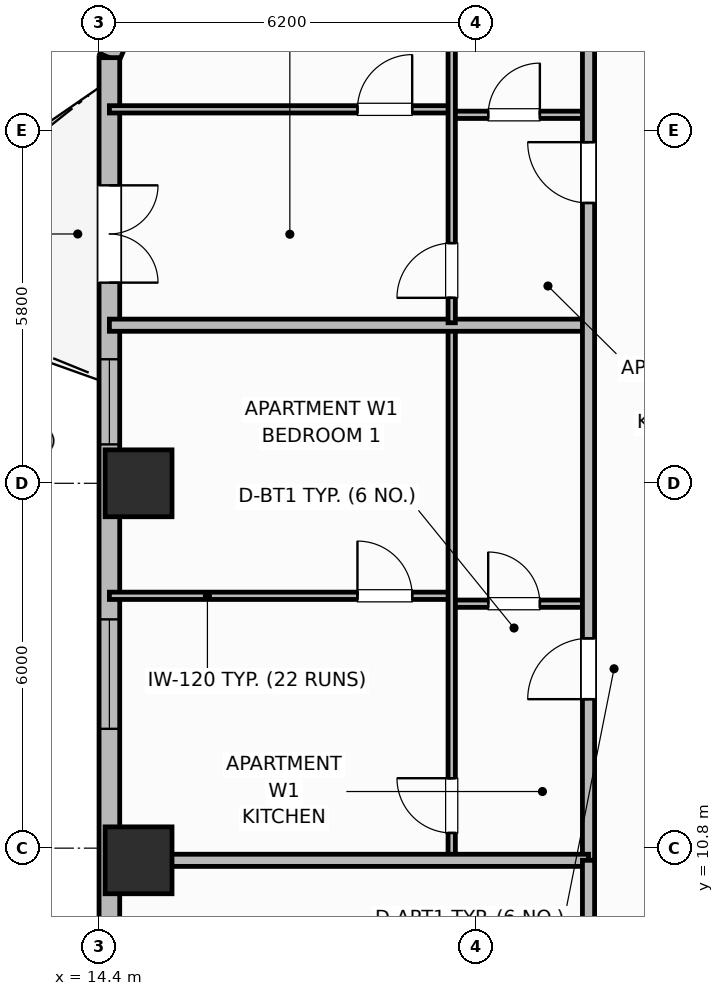
"""IFC4 building model, lengths in metres.
Left out: names, types, materials, properties, quantities, classifications, styles, units other than length and angle.
Written with IfcOpenShell. Run it as: python <this file> out.ifc"""

import sys

from ifc_helpers import new_model, si_unit, direction, frame, frame_2d, origin, origin_2d, place, context, subcontext, project, spatial, rectangle, extrude, element, fill, save


model = new_model("IFC4")
c1 = context("Model", 3, precision=1e-05, world=origin(), true_north=direction((0.0, 1.0)))
c2 = subcontext(c1, "Body", "Model", "MODEL_VIEW")
j1 = project(units=[si_unit("LENGTHUNIT", "METRE"), si_unit("PLANEANGLEUNIT", "RADIAN")], contexts=[c1])
p1 = place(None, origin())
s1 = spatial("IfcSite", under=j1, at=p1, CompositionType="ELEMENT")
p2 = place(p1, origin())
s2 = spatial("IfcBuilding", under=s1, at=p2, CompositionType="ELEMENT")
p3 = place(p2, frame((0.0, 0.0, 103.1)))
s3 = spatial("IfcBuildingStorey", under=s2, at=p3, CompositionType="ELEMENT", Elevation=103.1)
for number, where, z_axis, x_axis in (
    (1, (15.05, 10.6, 0.0), (0.0, 0.0, 1.0), (1.0, 0.0, 0.0)),
    (2, (15.05, 16.8, 0.0), (0.0, 0.0, 1.0), (1.0, 0.0, 0.0)),
):
    element("IfcColumn", number, at=place(p3, frame(where, z_axis=z_axis, x_axis=x_axis)), inside=s3, PredefinedType="COLUMN", context=c2, shape_type="SweptSolid", body=[
        extrude(rectangle(XDim=1.1, YDim=1.1, at=origin_2d()), origin(), (0.0, 0.0, 1.0), 3.7),
    ])
p4 = place(p3, frame((15.52, 26.0, 0.0), z_axis=(0.0, 0.0, 1.0), x_axis=(-0.396426258231, -0.918066567186, 0.0)))
e3 = element("IfcWall", 3, at=p4, inside=s3, PredefinedType="SOLIDWALL", context=c2, shape_type="SweptSolid", body=[
    extrude(rectangle(XDim=2.396, YDim=0.34, at=frame_2d((1.198, 0.0))), origin(), (0.0, 0.0, 1.0), 2.7),
])
p5 = place(p4, frame((0.648, 0.0, 0.89)))
e4 = element("IfcOpeningElement", 4, at=p5, cuts=e3, PredefinedType="OPENING", context=c2, shape_type="SweptSolid", body=[
    extrude(rectangle(XDim=1.1, YDim=1.65, at=frame_2d((0.55, 0.825))), frame((0.0, 0.18, 0.0), z_axis=(0.0, -1.0, 0.0), x_axis=(1.0, 0.0, 0.0)), (0.0, 0.0, 1.0), 0.36),
])
p6 = place(p3, frame((14.57, 23.8, 0.0), z_axis=(0.0, 0.0, 1.0), x_axis=(0.0, -1.0, 0.0)))
e5 = element("IfcWall", 5, at=p6, inside=s3, PredefinedType="SOLIDWALL", context=c2, shape_type="SweptSolid", body=[
    extrude(rectangle(XDim=14.8, YDim=0.34, at=frame_2d((7.4, 0.0))), origin(), (0.0, 0.0, 1.0), 2.7),
])
p7 = place(p6, frame((2.1, 0.0, 0.0)))
e6 = element("IfcOpeningElement", 6, at=p7, cuts=e5, PredefinedType="OPENING", context=c2, shape_type="SweptSolid", body=[
    extrude(rectangle(XDim=1.6, YDim=2.1, at=frame_2d((0.8, 1.05))), frame((0.0, 0.18, 0.0), z_axis=(0.0, -1.0, 0.0), x_axis=(1.0, 0.0, 0.0)), (0.0, 0.0, 1.0), 0.36),
])
p8 = place(p6, frame((4.96, 0.0, 0.69)))
e7 = element("IfcOpeningElement", 7, at=p8, cuts=e5, PredefinedType="OPENING", context=c2, shape_type="SweptSolid", body=[
    extrude(rectangle(XDim=1.4, YDim=1.85, at=frame_2d((0.7, 0.925))), frame((0.0, 0.18, 0.0), z_axis=(0.0, -1.0, 0.0), x_axis=(1.0, 0.0, 0.0)), (0.0, 0.0, 1.0), 0.36),
])
p9 = place(p6, frame((9.238, 0.0, 0.73)))
e8 = element("IfcOpeningElement", 8, at=p9, cuts=e5, PredefinedType="OPENING", context=c2, shape_type="SweptSolid", body=[
    extrude(rectangle(XDim=1.8, YDim=1.85, at=frame_2d((0.9, 0.925))), frame((0.0, 0.18, 0.0), z_axis=(0.0, -1.0, 0.0), x_axis=(1.0, 0.0, 0.0)), (0.0, 0.0, 1.0), 0.36),
])
p10 = place(p3, frame((20.2, 14.82, 0.0), z_axis=(0.0, 0.0, 1.0), x_axis=(1.0, 0.0, 0.0)))
e9 = element("IfcWall", 9, at=p10, inside=s3, PredefinedType="PARTITIONING", context=c2, shape_type="SweptSolid", body=[
    extrude(rectangle(XDim=2.25, YDim=0.12, at=frame_2d((1.125, 0.0))), origin(), (0.0, 0.0, 1.0), 2.53),
])
p11 = place(p10, frame((0.6, 0.0, 0.0)))
e10 = element("IfcOpeningElement", 10, at=p11, cuts=e9, PredefinedType="OPENING", context=c2, shape_type="SweptSolid", body=[
    extrude(rectangle(XDim=0.85, YDim=2.1, at=frame_2d((0.425, 1.05))), frame((0.0, 0.07, 0.0), z_axis=(0.0, -1.0, 0.0), x_axis=(1.0, 0.0, 0.0)), (0.0, 0.0, 1.0), 0.14),
])
p12 = place(p3, frame((14.57, 14.95, 0.0), z_axis=(0.0, 0.0, 1.0), x_axis=(1.0, 0.0, 0.0)))
e11 = element("IfcWall", 11, at=p12, inside=s3, PredefinedType="PARTITIONING", context=c2, shape_type="SweptSolid", body=[
    extrude(rectangle(XDim=5.63, YDim=0.12, at=frame_2d((2.815, 0.0))), origin(), (0.0, 0.0, 1.0), 2.53),
])
p13 = place(p12, frame((4.08, 0.0, 0.0)))
e12 = element("IfcOpeningElement", 12, at=p13, cuts=e11, PredefinedType="OPENING", context=c2, shape_type="SweptSolid", body=[
    extrude(rectangle(XDim=0.9, YDim=2.1, at=frame_2d((0.45, 1.05))), frame((0.0, 0.07, 0.0), z_axis=(0.0, -1.0, 0.0), x_axis=(1.0, 0.0, 0.0)), (0.0, 0.0, 1.0), 0.14),
])
p14 = place(p3, frame((20.2, 10.64, 0.0), z_axis=(0.0, 0.0, 1.0), x_axis=(0.0, 1.0, 0.0)))
e13 = element("IfcWall", 13, at=p14, inside=s3, PredefinedType="PARTITIONING", context=c2, shape_type="SweptSolid", body=[
    extrude(rectangle(XDim=8.72, YDim=0.12, at=frame_2d((4.36, 0.0))), origin(), (0.0, 0.0, 1.0), 2.53),
])
p15 = place(p14, frame((0.41, 0.0, 0.0)))
e14 = element("IfcOpeningElement", 14, at=p15, cuts=e13, PredefinedType="OPENING", context=c2, shape_type="SweptSolid", body=[
    extrude(rectangle(XDim=0.9, YDim=2.1, at=frame_2d((0.45, 1.05))), frame((0.0, 0.07, 0.0), z_axis=(0.0, -1.0, 0.0), x_axis=(1.0, 0.0, 0.0)), (0.0, 0.0, 1.0), 0.14),
])
p16 = place(p3, frame((14.57, 19.4, 0.0), z_axis=(0.0, 0.0, 1.0), x_axis=(1.0, 0.0, 0.0)))
e15 = element("IfcWall", 15, at=p16, inside=s3, PredefinedType="PARTITIONING", context=c2, shape_type="SweptSolid", body=[
    extrude(rectangle(XDim=7.88, YDim=0.2, at=frame_2d((3.94, 0.0))), origin(), (0.0, 0.0, 1.0), 2.53),
])
p17 = place(p3, frame((20.2, 22.86, 0.0), z_axis=(0.0, 0.0, 1.0), x_axis=(1.0, 0.0, 0.0)))
e16 = element("IfcWall", 16, at=p17, inside=s3, PredefinedType="PARTITIONING", context=c2, shape_type="SweptSolid", body=[
    extrude(rectangle(XDim=2.25, YDim=0.12, at=frame_2d((1.125, 0.0))), origin(), (0.0, 0.0, 1.0), 2.53),
])
p18 = place(p17, frame((0.6, 0.0, 0.0)))
e17 = element("IfcOpeningElement", 17, at=p18, cuts=e16, PredefinedType="OPENING", context=c2, shape_type="SweptSolid", body=[
    extrude(rectangle(XDim=0.85, YDim=2.1, at=frame_2d((0.425, 1.05))), frame((0.0, 0.07, 0.0), z_axis=(0.0, -1.0, 0.0), x_axis=(1.0, 0.0, 0.0)), (0.0, 0.0, 1.0), 0.14),
])
p19 = place(p3, frame((14.57, 22.95, 0.0), z_axis=(0.0, 0.0, 1.0), x_axis=(1.0, 0.0, 0.0)))
e18 = element("IfcWall", 18, at=p19, inside=s3, PredefinedType="PARTITIONING", context=c2, shape_type="SweptSolid", body=[
    extrude(rectangle(XDim=5.63, YDim=0.12, at=frame_2d((2.815, 0.0))), origin(), (0.0, 0.0, 1.0), 2.53),
])
p20 = place(p19, frame((4.08, 0.0, 0.0)))
e19 = element("IfcOpeningElement", 19, at=p20, cuts=e18, PredefinedType="OPENING", context=c2, shape_type="SweptSolid", body=[
    extrude(rectangle(XDim=0.9, YDim=2.1, at=frame_2d((0.45, 1.05))), frame((0.0, 0.07, 0.0), z_axis=(0.0, -1.0, 0.0), x_axis=(1.0, 0.0, 0.0)), (0.0, 0.0, 1.0), 0.14),
])
p21 = place(p3, frame((20.2, 19.44, 0.0), z_axis=(0.0, 0.0, 1.0), x_axis=(0.0, 1.0, 0.0)))
e20 = element("IfcWall", 20, at=p21, inside=s3, PredefinedType="PARTITIONING", context=c2, shape_type="SweptSolid", body=[
    extrude(rectangle(XDim=7.12, YDim=0.12, at=frame_2d((3.56, 0.0))), origin(), (0.0, 0.0, 1.0), 2.53),
])
p22 = place(p21, frame((0.41, 0.0, 0.0)))
e21 = element("IfcOpeningElement", 21, at=p22, cuts=e20, PredefinedType="OPENING", context=c2, shape_type="SweptSolid", body=[
    extrude(rectangle(XDim=0.9, YDim=2.1, at=frame_2d((0.45, 1.05))), frame((0.0, 0.07, 0.0), z_axis=(0.0, -1.0, 0.0), x_axis=(1.0, 0.0, 0.0)), (0.0, 0.0, 1.0), 0.14),
])
p23 = place(p3, frame((22.45, 10.6, 0.0), z_axis=(0.0, 0.0, 1.0), x_axis=(0.0, 1.0, 0.0)))
e22 = element("IfcWall", 22, at=p23, inside=s3, PredefinedType="PARTITIONING", context=c2, shape_type="SweptSolid", body=[
    extrude(rectangle(XDim=35.2, YDim=0.2, at=frame_2d((17.6, 0.0))), origin(), (0.0, 0.0, 1.0), 2.53),
])
p24 = place(p23, frame((2.65, 0.0, 0.0)))
e23 = element("IfcOpeningElement", 23, at=p24, cuts=e22, PredefinedType="OPENING", context=c2, shape_type="SweptSolid", body=[
    extrude(rectangle(XDim=1.0, YDim=2.15, at=frame_2d((0.5, 1.075))), frame((0.0, 0.11, 0.0), z_axis=(0.0, -1.0, 0.0), x_axis=(1.0, 0.0, 0.0)), (0.0, 0.0, 1.0), 0.22),
])
p25 = place(p23, frame((10.81, 0.0, 0.0)))
e24 = element("IfcOpeningElement", 24, at=p25, cuts=e22, PredefinedType="OPENING", context=c2, shape_type="SweptSolid", body=[
    extrude(rectangle(XDim=1.0, YDim=2.15, at=frame_2d((0.5, 1.075))), frame((0.0, 0.11, 0.0), z_axis=(0.0, -1.0, 0.0), x_axis=(1.0, 0.0, 0.0)), (0.0, 0.0, 1.0), 0.22),
])
p26 = place(p23, frame((19.54, 0.0, 0.0)))
e25 = element("IfcOpeningElement", 25, at=p26, cuts=e22, PredefinedType="OPENING", context=c2, shape_type="SweptSolid", body=[
    extrude(rectangle(XDim=1.0, YDim=2.15, at=frame_2d((0.5, 1.075))), frame((0.0, 0.11, 0.0), z_axis=(0.0, -1.0, 0.0), x_axis=(1.0, 0.0, 0.0)), (0.0, 0.0, 1.0), 0.22),
])
p27 = place(p23, frame((26.95, 0.0, 0.0)))
e26 = element("IfcOpeningElement", 26, at=p27, cuts=e22, PredefinedType="OPENING", context=c2, shape_type="SweptSolid", body=[
    extrude(rectangle(XDim=1.0, YDim=2.15, at=frame_2d((0.5, 1.075))), frame((0.0, 0.11, 0.0), z_axis=(0.0, -1.0, 0.0), x_axis=(1.0, 0.0, 0.0)), (0.0, 0.0, 1.0), 0.22),
])
p28 = place(p3, frame((14.99, 10.6, 0.0), z_axis=(0.0, 0.0, 1.0), x_axis=(1.0, 0.0, 0.0)))
e27 = element("IfcWall", 27, at=p28, inside=s3, PredefinedType="PARTITIONING", context=c2, shape_type="SweptSolid", body=[
    extrude(rectangle(XDim=7.46, YDim=0.2, at=frame_2d((3.73, 0.0))), origin(), (0.0, 0.0, 1.0), 2.53),
])
p29 = place(p3, frame((22.45, 4.97, 0.0), z_axis=(0.0, 0.0, 1.0), x_axis=(0.0, 1.0, 0.0)))
e28 = element("IfcWall", 28, at=p29, inside=s3, PredefinedType="PARTITIONING", context=c2, shape_type="SweptSolid", body=[
    extrude(rectangle(XDim=5.63, YDim=0.2, at=frame_2d((2.815, 0.0))), origin(), (0.0, 0.0, 1.0), 2.53),
])
p30 = place(p7, origin())
e29 = element("IfcDoor", 29, at=p30, inside=s3, OperationType="DOUBLE_DOOR_SINGLE_SWING", PredefinedType="DOOR", context=c2, shape_type="SweptSolid", body=[
    extrude(rectangle(XDim=1.6, YDim=2.1, at=frame_2d((0.8, 1.05))), frame((0.0, 0.025, 0.0), z_axis=(0.0, -1.0, 0.0), x_axis=(1.0, 0.0, 0.0)), (0.0, 0.0, 1.0), 0.05),
])
fill(e6, e29)
p31 = place(p8, origin())
e30 = element("IfcWindow", 30, at=p31, inside=s3, PartitioningType="SINGLE_PANEL", PredefinedType="WINDOW", context=c2, shape_type="SweptSolid", body=[
    extrude(rectangle(XDim=1.4, YDim=1.85, at=frame_2d((0.7, 0.925))), frame((0.0, 0.03, 0.0), z_axis=(0.0, -1.0, 0.0), x_axis=(1.0, 0.0, 0.0)), (0.0, 0.0, 1.0), 0.06),
])
fill(e7, e30)
p32 = place(p9, origin())
e31 = element("IfcWindow", 31, at=p32, inside=s3, PartitioningType="SINGLE_PANEL", PredefinedType="WINDOW", context=c2, shape_type="SweptSolid", body=[
    extrude(rectangle(XDim=1.8, YDim=1.85, at=frame_2d((0.9, 0.925))), frame((0.0, 0.03, 0.0), z_axis=(0.0, -1.0, 0.0), x_axis=(1.0, 0.0, 0.0)), (0.0, 0.0, 1.0), 0.06),
])
fill(e8, e31)
p33 = place(p11, origin())
e32 = element("IfcDoor", 32, at=p33, inside=s3, OperationType="SINGLE_SWING_LEFT", PredefinedType="DOOR", context=c2, shape_type="SweptSolid", body=[
    extrude(rectangle(XDim=0.85, YDim=2.1, at=frame_2d((0.425, 1.05))), frame((0.0, 0.025, 0.0), z_axis=(0.0, -1.0, 0.0), x_axis=(1.0, 0.0, 0.0)), (0.0, 0.0, 1.0), 0.05),
])
fill(e10, e32)
p34 = place(p13, origin())
e33 = element("IfcDoor", 33, at=p34, inside=s3, OperationType="SINGLE_SWING_LEFT", PredefinedType="DOOR", context=c2, shape_type="SweptSolid", body=[
    extrude(rectangle(XDim=0.9, YDim=2.1, at=frame_2d((0.45, 1.05))), frame((0.0, 0.025, 0.0), z_axis=(0.0, -1.0, 0.0), x_axis=(1.0, 0.0, 0.0)), (0.0, 0.0, 1.0), 0.05),
])
fill(e12, e33)
p35 = place(p15, origin())
e34 = element("IfcDoor", 34, at=p35, inside=s3, OperationType="SINGLE_SWING_RIGHT", PredefinedType="DOOR", context=c2, shape_type="SweptSolid", body=[
    extrude(rectangle(XDim=0.9, YDim=2.1, at=frame_2d((0.45, 1.05))), frame((0.0, 0.025, 0.0), z_axis=(0.0, -1.0, 0.0), x_axis=(1.0, 0.0, 0.0)), (0.0, 0.0, 1.0), 0.05),
])
fill(e14, e34)
p36 = place(p18, origin())
e35 = element("IfcDoor", 35, at=p36, inside=s3, OperationType="SINGLE_SWING_RIGHT", PredefinedType="DOOR", context=c2, shape_type="SweptSolid", body=[
    extrude(rectangle(XDim=0.85, YDim=2.1, at=frame_2d((0.425, 1.05))), frame((0.0, 0.025, 0.0), z_axis=(0.0, -1.0, 0.0), x_axis=(1.0, 0.0, 0.0)), (0.0, 0.0, 1.0), 0.05),
])
fill(e17, e35)
p37 = place(p20, origin())
e36 = element("IfcDoor", 36, at=p37, inside=s3, OperationType="SINGLE_SWING_RIGHT", PredefinedType="DOOR", context=c2, shape_type="SweptSolid", body=[
    extrude(rectangle(XDim=0.9, YDim=2.1, at=frame_2d((0.45, 1.05))), frame((0.0, 0.025, 0.0), z_axis=(0.0, -1.0, 0.0), x_axis=(1.0, 0.0, 0.0)), (0.0, 0.0, 1.0), 0.05),
])
fill(e19, e36)
p38 = place(p22, origin())
e37 = element("IfcDoor", 37, at=p38, inside=s3, OperationType="SINGLE_SWING_LEFT", PredefinedType="DOOR", context=c2, shape_type="SweptSolid", body=[
    extrude(rectangle(XDim=0.9, YDim=2.1, at=frame_2d((0.45, 1.05))), frame((0.0, 0.025, 0.0), z_axis=(0.0, -1.0, 0.0), x_axis=(1.0, 0.0, 0.0)), (0.0, 0.0, 1.0), 0.05),
])
fill(e21, e37)
p39 = place(p24, origin())
e38 = element("IfcDoor", 38, at=p39, inside=s3, OperationType="SINGLE_SWING_LEFT", PredefinedType="DOOR", context=c2, shape_type="SweptSolid", body=[
    extrude(rectangle(XDim=1.0, YDim=2.15, at=frame_2d((0.5, 1.075))), frame((0.0, 0.025, 0.0), z_axis=(0.0, -1.0, 0.0), x_axis=(1.0, 0.0, 0.0)), (0.0, 0.0, 1.0), 0.05),
])
fill(e23, e38)
p40 = place(p25, origin())
e39 = element("IfcDoor", 39, at=p40, inside=s3, OperationType="SINGLE_SWING_RIGHT", PredefinedType="DOOR", context=c2, shape_type="SweptSolid", body=[
    extrude(rectangle(XDim=1.0, YDim=2.15, at=frame_2d((0.5, 1.075))), frame((0.0, 0.025, 0.0), z_axis=(0.0, -1.0, 0.0), x_axis=(1.0, 0.0, 0.0)), (0.0, 0.0, 1.0), 0.05),
])
fill(e24, e39)
save(model, sys.argv[1])
